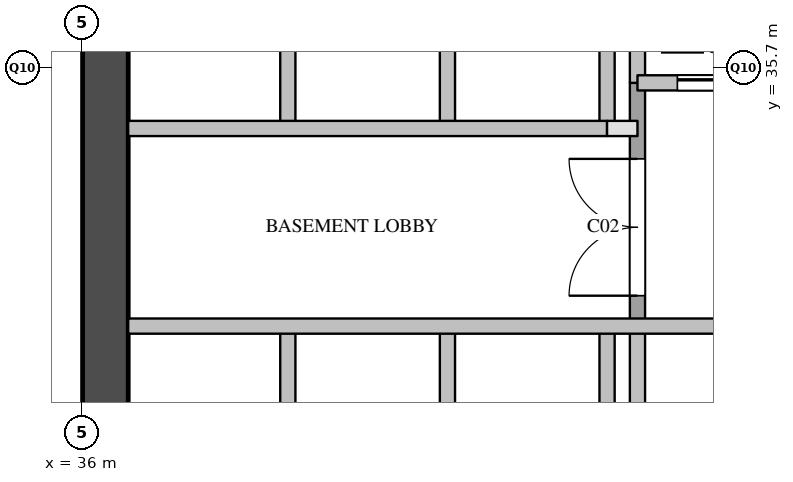
"""IFC4 building model, lengths in metres.
Left out: names, types, materials, properties, quantities, classifications, styles, units other than length and angle.
Written with IfcOpenShell. Run it as: python <this file> out.ifc"""

import sys

from ifc_helpers import new_model, si_unit, direction, frame, frame_2d, origin, place, context, subcontext, project, spatial, rectangle, extrude, element, fill, save


model = new_model("IFC4")
c1 = context("Model", 3, precision=1e-05, world=origin(), true_north=direction((0.0, 1.0)))
c2 = subcontext(c1, "Body", "Model", "MODEL_VIEW")
j1 = project(units=[si_unit("LENGTHUNIT", "METRE"), si_unit("PLANEANGLEUNIT", "RADIAN")], contexts=[c1])
p1 = place(None, origin())
s1 = spatial("IfcSite", under=j1, at=p1, CompositionType="ELEMENT")
p2 = place(p1, origin())
s2 = spatial("IfcBuilding", under=s1, at=p2, CompositionType="ELEMENT")
p3 = place(p2, frame((0.0, 0.0, -6.0)))
s3 = spatial("IfcBuildingStorey", under=s2, at=p3, CompositionType="ELEMENT", Elevation=-6.0)
p4 = place(p3, frame((36.3, 29.1, 0.0), z_axis=(0.0, 0.0, 1.0), x_axis=(0.0, 1.0, 0.0)))
e1 = element("IfcWall", 1, at=p4, inside=s3, PredefinedType="SHEAR", context=c2, shape_type="SweptSolid", body=[
    extrude(rectangle(XDim=20.3, YDim=0.6, at=frame_2d((10.15, 0.0))), origin(), (0.0, 0.0, 1.0), 5.59),
])
p5 = place(p4, frame((16.4, 0.0, 0.0)))
e2 = element("IfcOpeningElement", 2, at=p5, cuts=e1, PredefinedType="OPENING", context=c2, shape_type="SweptSolid", body=[
    extrude(rectangle(XDim=1.0, YDim=2.1, at=frame_2d((0.5, 1.05))), frame((0.0, 0.31, 0.0), z_axis=(0.0, -1.0, 0.0), x_axis=(1.0, 0.0, 0.0)), (0.0, 0.0, 1.0), 0.62),
])
p6 = place(p3, frame((38.7, 29.1, 0.0), z_axis=(0.0, 0.0, 1.0), x_axis=(0.0, 1.0, 0.0)))
e3 = element("IfcWall", 3, at=p6, inside=s3, PredefinedType="SOLIDWALL", context=c2, shape_type="SweptSolid", body=[
    extrude(rectangle(XDim=3.2, YDim=0.2, at=frame_2d((1.6, 0.0))), origin(), (0.0, 0.0, 1.0), 5.59),
])
p7 = place(p3, frame((38.7, 34.9, 0.0), z_axis=(0.0, 0.0, 1.0), x_axis=(0.0, 1.0, 0.0)))
e4 = element("IfcWall", 4, at=p7, inside=s3, PredefinedType="SOLIDWALL", context=c2, shape_type="SweptSolid", body=[
    extrude(rectangle(XDim=3.2, YDim=0.2, at=frame_2d((1.6, 0.0))), origin(), (0.0, 0.0, 1.0), 5.59),
])
p8 = place(p3, frame((40.8, 29.1, 0.0), z_axis=(0.0, 0.0, 1.0), x_axis=(0.0, 1.0, 0.0)))
e5 = element("IfcWall", 5, at=p8, inside=s3, PredefinedType="SOLIDWALL", context=c2, shape_type="SweptSolid", body=[
    extrude(rectangle(XDim=3.2, YDim=0.2, at=frame_2d((1.6, 0.0))), origin(), (0.0, 0.0, 1.0), 5.59),
])
p9 = place(p3, frame((40.8, 34.9, 0.0), z_axis=(0.0, 0.0, 1.0), x_axis=(0.0, 1.0, 0.0)))
e6 = element("IfcWall", 6, at=p9, inside=s3, PredefinedType="SOLIDWALL", context=c2, shape_type="SweptSolid", body=[
    extrude(rectangle(XDim=3.2, YDim=0.2, at=frame_2d((1.6, 0.0))), origin(), (0.0, 0.0, 1.0), 5.59),
])
p10 = place(p3, frame((42.9, 29.1, 0.0), z_axis=(0.0, 0.0, 1.0), x_axis=(0.0, 1.0, 0.0)))
e7 = element("IfcWall", 7, at=p10, inside=s3, PredefinedType="SOLIDWALL", context=c2, shape_type="SweptSolid", body=[
    extrude(rectangle(XDim=3.2, YDim=0.2, at=frame_2d((1.6, 0.0))), origin(), (0.0, 0.0, 1.0), 5.59),
])
p11 = place(p3, frame((42.9, 34.9, 0.0), z_axis=(0.0, 0.0, 1.0), x_axis=(0.0, 1.0, 0.0)))
e8 = element("IfcWall", 8, at=p11, inside=s3, PredefinedType="SOLIDWALL", context=c2, shape_type="SweptSolid", body=[
    extrude(rectangle(XDim=3.2, YDim=0.2, at=frame_2d((1.6, 0.0))), origin(), (0.0, 0.0, 1.0), 5.59),
])
for number, where, z_axis, x_axis in (
    (9, (43.3, 29.1, 0.0), (0.0, 0.0, 1.0), (0.0, 1.0, 0.0)),
    (10, (43.3, 35.5, 0.0), (0.0, 0.0, 1.0), (0.0, 1.0, 0.0)),
):
    element("IfcWall", number, at=place(p3, frame(where, z_axis=z_axis, x_axis=x_axis)), inside=s3, PredefinedType="SOLIDWALL", context=c2, shape_type="SweptSolid", body=[
        extrude(rectangle(XDim=3.2, YDim=0.2, at=frame_2d((1.6, 0.0))), origin(), (0.0, 0.0, 1.0), 5.59),
    ])
p12 = place(p3, frame((43.3, 32.3, 0.0), z_axis=(0.0, 0.0, 1.0), x_axis=(0.0, 1.0, 0.0)))
e11 = element("IfcWall", 11, at=p12, inside=s3, PredefinedType="SOLIDWALL", context=c2, shape_type="SweptSolid", body=[
    extrude(rectangle(XDim=3.2, YDim=0.2, at=frame_2d((1.6, 0.0))), origin(), (0.0, 0.0, 1.0), 5.59),
])
p13 = place(p12, frame((0.4, 0.0, 0.0)))
e12 = element("IfcOpeningElement", 12, at=p13, cuts=e11, PredefinedType="OPENING", context=c2, shape_type="SweptSolid", body=[
    extrude(rectangle(XDim=1.8, YDim=2.1, at=frame_2d((0.9, 1.05))), frame((0.0, 0.11, 0.0), z_axis=(0.0, -1.0, 0.0), x_axis=(1.0, 0.0, 0.0)), (0.0, 0.0, 1.0), 0.22),
])
p14 = place(p3, frame((36.6, 32.3, 0.0), z_axis=(0.0, 0.0, 1.0), x_axis=(1.0, 0.0, 0.0)))
e13 = element("IfcWall", 13, at=p14, inside=s3, PredefinedType="SOLIDWALL", context=c2, shape_type="SweptSolid", body=[
    extrude(rectangle(XDim=11.2, YDim=0.2, at=frame_2d((5.6, 0.0))), origin(), (0.0, 0.0, 1.0), 5.59),
])
p15 = place(p3, frame((42.9, 34.9, 0.0), z_axis=(0.0, 0.0, 1.0), x_axis=(1.0, 0.0, 0.0)))
e14 = element("IfcWall", 14, at=p15, inside=s3, PredefinedType="PARTITIONING", context=c2, shape_type="SweptSolid", body=[
    extrude(rectangle(XDim=0.4, YDim=0.2, at=frame_2d((0.2, 0.0))), origin(), (0.0, 0.0, 1.0), 5.59),
])
p16 = place(p3, frame((36.6, 34.9, 0.0), z_axis=(0.0, 0.0, 1.0), x_axis=(1.0, 0.0, 0.0)))
e15 = element("IfcWall", 15, at=p16, inside=s3, PredefinedType="SOLIDWALL", context=c2, shape_type="SweptSolid", body=[
    extrude(rectangle(XDim=6.3, YDim=0.2, at=frame_2d((3.15, 0.0))), origin(), (0.0, 0.0, 1.0), 5.59),
])
p17 = place(p3, frame((43.3, 35.5, 0.0), z_axis=(0.0, 0.0, 1.0), x_axis=(1.0, 0.0, 0.0)))
e16 = element("IfcWall", 16, at=p17, inside=s3, PredefinedType="SOLIDWALL", context=c2, shape_type="SweptSolid", body=[
    extrude(rectangle(XDim=2.25, YDim=0.2, at=frame_2d((1.125, 0.0))), origin(), (0.0, 0.0, 1.0), 5.59),
])
p18 = place(p17, frame((0.525, 0.0, 0.0)))
e17 = element("IfcOpeningElement", 17, at=p18, cuts=e16, PredefinedType="OPENING", context=c2, shape_type="SweptSolid", body=[
    extrude(rectangle(XDim=1.2, YDim=2.1, at=frame_2d((0.6, 1.05))), frame((0.0, 0.11, 0.0), z_axis=(0.0, -1.0, 0.0), x_axis=(1.0, 0.0, 0.0)), (0.0, 0.0, 1.0), 0.22),
])
p19 = place(p18, origin())
e18 = element("IfcDoor", 18, at=p19, inside=s3, OperationType="SLIDING_TO_LEFT", PredefinedType="DOOR", context=c2, shape_type="SweptSolid", body=[
    extrude(rectangle(XDim=1.2, YDim=2.1, at=frame_2d((0.6, 1.05))), frame((0.0, 0.025, 0.0), z_axis=(0.0, -1.0, 0.0), x_axis=(1.0, 0.0, 0.0)), (0.0, 0.0, 1.0), 0.05),
])
fill(e17, e18)
p20 = place(p13, origin())
e19 = element("IfcDoor", 19, at=p20, inside=s3, OperationType="DOUBLE_DOOR_SINGLE_SWING", PredefinedType="DOOR", context=c2, shape_type="SweptSolid", body=[
    extrude(rectangle(XDim=1.8, YDim=2.1, at=frame_2d((0.9, 1.05))), frame((0.0, 0.025, 0.0), z_axis=(0.0, -1.0, 0.0), x_axis=(1.0, 0.0, 0.0)), (0.0, 0.0, 1.0), 0.05),
])
fill(e12, e19)
save(model, sys.argv[1])
